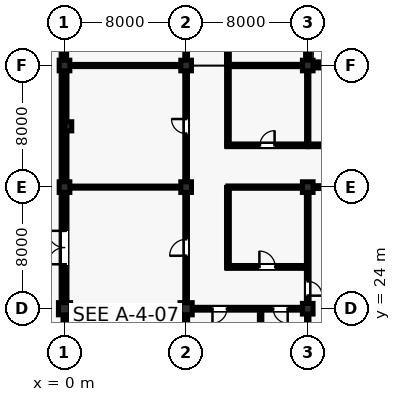
"""IFC4 building model, lengths in metres.
Left out: names, types, materials, properties, quantities, classifications, styles, units other than length and angle.
Written with IfcOpenShell. Run it as: python <this file> out.ifc"""

import sys

from ifc_helpers import new_model, si_unit, direction, frame, frame_2d, origin, origin_2d, place, context, subcontext, project, spatial, rectangle, extrude, element, fill, save


model = new_model("IFC4")
c1 = context("Model", 3, precision=1e-05, world=origin(), true_north=direction((0.0, 1.0)))
c2 = subcontext(c1, "Body", "Model", "MODEL_VIEW")
j1 = project(units=[si_unit("LENGTHUNIT", "METRE"), si_unit("PLANEANGLEUNIT", "RADIAN")], contexts=[c1])
p1 = place(None, origin())
s1 = spatial("IfcSite", under=j1, at=p1, CompositionType="ELEMENT")
p2 = place(p1, origin())
s2 = spatial("IfcBuilding", under=s1, at=p2, CompositionType="ELEMENT")
p3 = place(p2, origin())
s3 = spatial("IfcBuildingStorey", under=s2, at=p3, CompositionType="ELEMENT", Elevation=0.0)
p4 = place(p3, frame((0.0, 24.0, 0.0), z_axis=(0.0, 0.0, 1.0), x_axis=(1.0, 0.0, 0.0)))
e1 = element("IfcColumn", 1, at=p4, inside=s3, PredefinedType="COLUMN", context=c2, shape_type="SweptSolid", body=[
    extrude(rectangle(XDim=0.8, YDim=0.8, at=origin_2d()), origin(), (0.0, 0.0, 1.0), 5.28),
])
for number, where, z_axis, x_axis in (
    (2, (0.0, 32.0, 0.0), (0.0, 0.0, 1.0), (1.0, 0.0, 0.0)),
    (3, (0.0, 40.0, 0.0), (0.0, 0.0, 1.0), (1.0, 0.0, 0.0)),
):
    element("IfcColumn", number, at=place(p3, frame(where, z_axis=z_axis, x_axis=x_axis)), inside=s3, PredefinedType="COLUMN", context=c2, shape_type="SweptSolid", body=[
        extrude(rectangle(XDim=0.7, YDim=0.7, at=origin_2d()), origin(), (0.0, 0.0, 1.0), 5.28),
    ])
p5 = place(p3, frame((8.0, 24.0, 0.0), z_axis=(0.0, 0.0, 1.0), x_axis=(1.0, 0.0, 0.0)))
e4 = element("IfcColumn", 4, at=p5, inside=s3, PredefinedType="COLUMN", context=c2, shape_type="SweptSolid", body=[
    extrude(rectangle(XDim=0.8, YDim=0.8, at=origin_2d()), origin(), (0.0, 0.0, 1.0), 5.28),
])
for number, where, z_axis, x_axis in (
    (5, (8.0, 32.0, 0.0), (0.0, 0.0, 1.0), (1.0, 0.0, 0.0)),
    (6, (8.0, 40.0, 0.0), (0.0, 0.0, 1.0), (1.0, 0.0, 0.0)),
    (7, (16.0, 24.0, 0.0), (0.0, 0.0, 1.0), (1.0, 0.0, 0.0)),
    (8, (16.0, 32.0, 0.0), (0.0, 0.0, 1.0), (1.0, 0.0, 0.0)),
    (9, (16.0, 40.0, 0.0), (0.0, 0.0, 1.0), (1.0, 0.0, 0.0)),
):
    element("IfcColumn", number, at=place(p3, frame(where, z_axis=z_axis, x_axis=x_axis)), inside=s3, PredefinedType="COLUMN", context=c2, shape_type="SweptSolid", body=[
        extrude(rectangle(XDim=0.7, YDim=0.7, at=origin_2d()), origin(), (0.0, 0.0, 1.0), 5.28),
    ])
p6 = place(p3, frame((0.25, 36.0, 0.0), z_axis=(0.0, 0.0, 1.0), x_axis=(1.0, 0.0, 0.0)))
e10 = element("IfcColumn", 10, at=p6, inside=s3, PredefinedType="PILASTER", context=c2, shape_type="SweptSolid", body=[
    extrude(rectangle(XDim=0.45, YDim=0.6, at=origin_2d()), origin(), (0.0, 0.0, 1.0), 5.28),
])
p7 = place(p3, frame((0.0, 24.385, 0.0), z_axis=(0.0, 0.0, 1.0), x_axis=(0.0, 1.0, 0.0)))
e11 = element("IfcWall", 11, at=p7, inside=s3, PredefinedType="SOLIDWALL", context=c2, shape_type="SweptSolid", body=[
    extrude(rectangle(XDim=7.28, YDim=0.32, at=frame_2d((3.64, 0.0))), origin(), (0.0, 0.0, 1.0), 4.677),
])
p8 = place(p7, frame((2.54, 0.0, 0.0)))
e12 = element("IfcOpeningElement", 12, at=p8, cuts=e11, PredefinedType="OPENING", context=c2, shape_type="SweptSolid", body=[
    extrude(rectangle(XDim=2.2, YDim=2.5, at=frame_2d((1.1, 1.25))), frame((0.0, 0.17, 0.0), z_axis=(0.0, -1.0, 0.0), x_axis=(1.0, 0.0, 0.0)), (0.0, 0.0, 1.0), 0.34),
])
p9 = place(p3, frame((0.0, 32.335, 0.0), z_axis=(0.0, 0.0, 1.0), x_axis=(0.0, 1.0, 0.0)))
e13 = element("IfcWall", 13, at=p9, inside=s3, PredefinedType="SOLIDWALL", context=c2, shape_type="SweptSolid", body=[
    extrude(rectangle(XDim=7.33, YDim=0.32, at=frame_2d((3.665, 0.0))), origin(), (0.0, 0.0, 1.0), 4.61),
])
p10 = place(p9, frame((4.25, 0.0, 0.9)))
e14 = element("IfcOpeningElement", 14, at=p10, cuts=e13, PredefinedType="OPENING", context=c2, shape_type="SweptSolid", body=[
    extrude(rectangle(XDim=2.4, YDim=2.8, at=frame_2d((1.2, 1.4))), frame((0.0, 0.17, 0.0), z_axis=(0.0, -1.0, 0.0), x_axis=(1.0, 0.0, 0.0)), (0.0, 0.0, 1.0), 0.34),
])
p11 = place(p3, frame((0.0, 40.335, 0.0), z_axis=(0.0, 0.0, 1.0), x_axis=(0.0, 1.0, 0.0)))
e15 = element("IfcWall", 15, at=p11, inside=s3, PredefinedType="SOLIDWALL", context=c2, shape_type="SweptSolid", body=[
    extrude(rectangle(XDim=7.33, YDim=0.28, at=frame_2d((3.665, 0.0))), origin(), (0.0, 0.0, 1.0), 4.674),
])
p12 = place(p11, frame((3.09, 0.0, 0.0)))
e16 = element("IfcOpeningElement", 16, at=p12, cuts=e15, PredefinedType="OPENING", context=c2, shape_type="SweptSolid", body=[
    extrude(rectangle(XDim=1.15, YDim=2.2, at=frame_2d((0.575, 1.1))), frame((0.0, 0.15, 0.0), z_axis=(0.0, -1.0, 0.0), x_axis=(1.0, 0.0, 0.0)), (0.0, 0.0, 1.0), 0.3),
])
p13 = place(p3, frame((16.0, 40.335, 0.0), z_axis=(0.0, 0.0, 1.0), x_axis=(0.0, 1.0, 0.0)))
e17 = element("IfcWall", 17, at=p13, inside=s3, PredefinedType="SOLIDWALL", context=c2, shape_type="SweptSolid", body=[
    extrude(rectangle(XDim=7.33, YDim=0.28, at=frame_2d((3.665, 0.0))), origin(), (0.0, 0.0, 1.0), 4.677),
])
p14 = place(p13, frame((2.74, 0.0, 0.9)))
e18 = element("IfcOpeningElement", 18, at=p14, cuts=e17, PredefinedType="OPENING", context=c2, shape_type="SweptSolid", body=[
    extrude(rectangle(XDim=1.85, YDim=2.65, at=frame_2d((0.925, 1.325))), frame((0.0, 0.15, 0.0), z_axis=(0.0, -1.0, 0.0), x_axis=(1.0, 0.0, 0.0)), (0.0, 0.0, 1.0), 0.3),
])
p15 = place(p3, frame((16.335, 40.0, 0.0), z_axis=(0.0, 0.0, 1.0), x_axis=(1.0, 0.0, 0.0)))
e19 = element("IfcWall", 19, at=p15, inside=s3, PredefinedType="SOLIDWALL", context=c2, shape_type="SweptSolid", body=[
    extrude(rectangle(XDim=7.33, YDim=0.32, at=frame_2d((3.665, 0.0))), origin(), (0.0, 0.0, 1.0), 4.677),
])
p16 = place(p15, frame((2.74, 0.0, 0.9)))
e20 = element("IfcOpeningElement", 20, at=p16, cuts=e19, PredefinedType="OPENING", context=c2, shape_type="SweptSolid", body=[
    extrude(rectangle(XDim=1.85, YDim=2.65, at=frame_2d((0.925, 1.325))), frame((0.0, 0.17, 0.0), z_axis=(0.0, -1.0, 0.0), x_axis=(1.0, 0.0, 0.0)), (0.0, 0.0, 1.0), 0.34),
])
for number, where, z_axis, x_axis in (
    (21, (0.05, 16.29, 0.0), (0.0, 0.0, 1.0), (0.0, 1.0, 0.0)),
    (22, (0.29, 23.95, 0.0), (0.0, 0.0, 1.0), (1.0, 0.0, 0.0)),
    (23, (7.95, 16.29, 0.0), (0.0, 0.0, 1.0), (0.0, 1.0, 0.0)),
):
    element("IfcWall", number, at=place(p3, frame(where, z_axis=z_axis, x_axis=x_axis)), inside=s3, PredefinedType="SHEAR", context=c2, shape_type="SweptSolid", body=[
        extrude(rectangle(XDim=7.42, YDim=0.3, at=frame_2d((3.71, 0.0))), origin(), (0.0, 0.0, 1.0), 5.035),
    ])
p17 = place(p3, frame((4.0, 16.05, 0.0), z_axis=(0.0, 0.0, 1.0), x_axis=(0.0, 1.0, 0.0)))
e24 = element("IfcWall", 24, at=p17, inside=s3, PredefinedType="SHEAR", context=c2, shape_type="SweptSolid", body=[
    extrude(rectangle(XDim=7.9, YDim=0.3, at=frame_2d((3.95, 0.0))), origin(), (0.0, 0.0, 1.0), 5.035),
])
p18 = place(p17, frame((0.55, 0.0, 0.0)))
e25 = element("IfcOpeningElement", 25, at=p18, cuts=e24, PredefinedType="OPENING", context=c2, shape_type="SweptSolid", body=[
    extrude(rectangle(XDim=1.1, YDim=2.15, at=frame_2d((0.55, 1.075))), frame((0.0, 0.16, 0.0), z_axis=(0.0, -1.0, 0.0), x_axis=(1.0, 0.0, 0.0)), (0.0, 0.0, 1.0), 0.32),
])
p19 = place(p3, frame((10.7, 26.75, 0.0), z_axis=(0.0, 0.0, 1.0), x_axis=(1.0, 0.0, 0.0)))
e26 = element("IfcWall", 26, at=p19, inside=s3, PredefinedType="PARTITIONING", context=c2, shape_type="SweptSolid", body=[
    extrude(rectangle(XDim=5.28, YDim=0.185, at=frame_2d((2.64, 0.0))), origin(), (0.0, 0.0, 1.0), 4.667),
])
p20 = place(p19, frame((2.12, 0.0, 0.0)))
e27 = element("IfcOpeningElement", 27, at=p20, cuts=e26, PredefinedType="OPENING", context=c2, shape_type="SweptSolid", body=[
    extrude(rectangle(XDim=1.04, YDim=2.18, at=frame_2d((0.52, 1.09))), frame((0.0, 0.103, 0.0), z_axis=(0.0, -1.0, 0.0), x_axis=(1.0, 0.0, 0.0)), (0.0, 0.0, 1.0), 0.205),
])
p21 = place(p3, frame((10.75, 26.7, 0.0), z_axis=(0.0, 0.0, 1.0), x_axis=(0.0, 1.0, 0.0)))
e28 = element("IfcWall", 28, at=p21, inside=s3, PredefinedType="PARTITIONING", context=c2, shape_type="SweptSolid", body=[
    extrude(rectangle(XDim=5.28, YDim=0.185, at=frame_2d((2.64, 0.0))), origin(), (0.0, 0.0, 1.0), 4.403),
])
p22 = place(p3, frame((10.75, 32.0, 0.0), z_axis=(0.0, 0.0, 1.0), x_axis=(1.0, 0.0, 0.0)))
e29 = element("IfcWall", 29, at=p22, inside=s3, PredefinedType="PARTITIONING", context=c2, shape_type="SweptSolid", body=[
    extrude(rectangle(XDim=4.89, YDim=0.15, at=frame_2d((2.445, 0.0))), origin(), (0.0, 0.0, 1.0), 4.403),
])
p23 = place(p3, frame((10.7, 34.75, 0.0), z_axis=(0.0, 0.0, 1.0), x_axis=(1.0, 0.0, 0.0)))
e30 = element("IfcWall", 30, at=p23, inside=s3, PredefinedType="PARTITIONING", context=c2, shape_type="SweptSolid", body=[
    extrude(rectangle(XDim=5.28, YDim=0.175, at=frame_2d((2.64, 0.0))), origin(), (0.0, 0.0, 1.0), 4.404),
])
p24 = place(p23, frame((2.16, 0.0, 0.0)))
e31 = element("IfcOpeningElement", 31, at=p24, cuts=e30, PredefinedType="OPENING", context=c2, shape_type="SweptSolid", body=[
    extrude(rectangle(XDim=0.96, YDim=2.14, at=frame_2d((0.48, 1.07))), frame((0.0, 0.097, 0.0), z_axis=(0.0, -1.0, 0.0), x_axis=(1.0, 0.0, 0.0)), (0.0, 0.0, 1.0), 0.195),
])
p25 = place(p3, frame((10.75, 34.7, 0.0), z_axis=(0.0, 0.0, 1.0), x_axis=(0.0, 1.0, 0.0)))
e32 = element("IfcWall", 32, at=p25, inside=s3, PredefinedType="PARTITIONING", context=c2, shape_type="SweptSolid", body=[
    extrude(rectangle(XDim=5.28, YDim=0.175, at=frame_2d((2.64, 0.0))), origin(), (0.0, 0.0, 1.0), 4.336),
])
p26 = place(p3, frame((10.75, 40.0, 0.0), z_axis=(0.0, 0.0, 1.0), x_axis=(1.0, 0.0, 0.0)))
e33 = element("IfcWall", 33, at=p26, inside=s3, PredefinedType="PARTITIONING", context=c2, shape_type="SweptSolid", body=[
    extrude(rectangle(XDim=4.89, YDim=0.15, at=frame_2d((2.445, 0.0))), origin(), (0.0, 0.0, 1.0), 4.336),
])
p27 = place(p3, frame((16.0, 34.75, 0.0), z_axis=(0.0, 0.0, 1.0), x_axis=(0.0, 1.0, 0.0)))
e34 = element("IfcWall", 34, at=p27, inside=s3, PredefinedType="PARTITIONING", context=c2, shape_type="SweptSolid", body=[
    extrude(rectangle(XDim=4.89, YDim=0.15, at=frame_2d((2.445, 0.0))), origin(), (0.0, 0.0, 1.0), 4.404),
])
p28 = place(p3, frame((10.75, 40.02, 0.0), z_axis=(0.0, 0.0, 1.0), x_axis=(0.0, 1.0, 0.0)))
e35 = element("IfcWall", 35, at=p28, inside=s3, PredefinedType="PARTITIONING", context=c2, shape_type="SweptSolid", body=[
    extrude(rectangle(XDim=7.96, YDim=0.185, at=frame_2d((3.98, 0.0))), origin(), (0.0, 0.0, 1.0), 4.336),
])
p29 = place(p28, frame((3.42, 0.0, 0.0)))
e36 = element("IfcOpeningElement", 36, at=p29, cuts=e35, PredefinedType="OPENING", context=c2, shape_type="SweptSolid", body=[
    extrude(rectangle(XDim=1.12, YDim=2.22, at=frame_2d((0.56, 1.11))), frame((0.0, 0.103, 0.0), z_axis=(0.0, -1.0, 0.0), x_axis=(1.0, 0.0, 0.0)), (0.0, 0.0, 1.0), 0.205),
])
p30 = place(p3, frame((16.02, 34.75, 0.0), z_axis=(0.0, 0.0, 1.0), x_axis=(1.0, 0.0, 0.0)))
e37 = element("IfcWall", 37, at=p30, inside=s3, PredefinedType="PARTITIONING", context=c2, shape_type="SweptSolid", body=[
    extrude(rectangle(XDim=7.96, YDim=0.175, at=frame_2d((3.98, 0.0))), origin(), (0.0, 0.0, 1.0), 4.404),
])
p31 = place(p30, frame((3.49, 0.0, 0.0)))
e38 = element("IfcOpeningElement", 38, at=p31, cuts=e37, PredefinedType="OPENING", context=c2, shape_type="SweptSolid", body=[
    extrude(rectangle(XDim=0.98, YDim=2.15, at=frame_2d((0.49, 1.075))), frame((0.0, 0.097, 0.0), z_axis=(0.0, -1.0, 0.0), x_axis=(1.0, 0.0, 0.0)), (0.0, 0.0, 1.0), 0.195),
])
p32 = place(p3, frame((8.0, 24.39, 0.0), z_axis=(0.0, 0.0, 1.0), x_axis=(0.0, 1.0, 0.0)))
e39 = element("IfcWall", 39, at=p32, inside=s3, PredefinedType="PARTITIONING", context=c2, shape_type="SweptSolid", body=[
    extrude(rectangle(XDim=7.27, YDim=0.175, at=frame_2d((3.635, 0.0))), origin(), (0.0, 0.0, 1.0), 4.403),
])
p33 = place(p32, frame((3.095, 0.0, 0.0)))
e40 = element("IfcOpeningElement", 40, at=p33, cuts=e39, PredefinedType="OPENING", context=c2, shape_type="SweptSolid", body=[
    extrude(rectangle(XDim=1.08, YDim=2.2, at=frame_2d((0.54, 1.1))), frame((0.0, 0.097, 0.0), z_axis=(0.0, -1.0, 0.0), x_axis=(1.0, 0.0, 0.0)), (0.0, 0.0, 1.0), 0.195),
])
p34 = place(p3, frame((0.34, 32.0, 0.0), z_axis=(0.0, 0.0, 1.0), x_axis=(1.0, 0.0, 0.0)))
e41 = element("IfcWall", 41, at=p34, inside=s3, PredefinedType="PARTITIONING", context=c2, shape_type="SweptSolid", body=[
    extrude(rectangle(XDim=7.32, YDim=0.135, at=frame_2d((3.66, 0.0))), origin(), (0.0, 0.0, 1.0), 4.327),
])
p35 = place(p3, frame((8.0, 32.34, 0.0), z_axis=(0.0, 0.0, 1.0), x_axis=(0.0, 1.0, 0.0)))
e42 = element("IfcWall", 42, at=p35, inside=s3, PredefinedType="PARTITIONING", context=c2, shape_type="SweptSolid", body=[
    extrude(rectangle(XDim=7.32, YDim=0.175, at=frame_2d((3.66, 0.0))), origin(), (0.0, 0.0, 1.0), 4.412),
])
p36 = place(p35, frame((3.18, 0.0, 0.0)))
e43 = element("IfcOpeningElement", 43, at=p36, cuts=e42, PredefinedType="OPENING", context=c2, shape_type="SweptSolid", body=[
    extrude(rectangle(XDim=0.96, YDim=2.14, at=frame_2d((0.48, 1.07))), frame((0.0, 0.097, 0.0), z_axis=(0.0, -1.0, 0.0), x_axis=(1.0, 0.0, 0.0)), (0.0, 0.0, 1.0), 0.195),
])
p37 = place(p3, frame((0.34, 40.0, 0.0), z_axis=(0.0, 0.0, 1.0), x_axis=(1.0, 0.0, 0.0)))
e44 = element("IfcWall", 44, at=p37, inside=s3, PredefinedType="PARTITIONING", context=c2, shape_type="SweptSolid", body=[
    extrude(rectangle(XDim=7.32, YDim=0.142, at=frame_2d((3.66, 0.0))), origin(), (0.0, 0.0, 1.0), 4.403),
])
p38 = place(p3, frame((8.0, 40.34, 0.0), z_axis=(0.0, 0.0, 1.0), x_axis=(0.0, 1.0, 0.0)))
e45 = element("IfcWall", 45, at=p38, inside=s3, PredefinedType="PARTITIONING", context=c2, shape_type="SweptSolid", body=[
    extrude(rectangle(XDim=7.32, YDim=0.175, at=frame_2d((3.66, 0.0))), origin(), (0.0, 0.0, 1.0), 4.404),
])
p39 = place(p38, frame((3.06, 0.0, 0.0)))
e46 = element("IfcOpeningElement", 46, at=p39, cuts=e45, PredefinedType="OPENING", context=c2, shape_type="SweptSolid", body=[
    extrude(rectangle(XDim=1.2, YDim=2.15, at=frame_2d((0.6, 1.075))), frame((0.0, 0.097, 0.0), z_axis=(0.0, -1.0, 0.0), x_axis=(1.0, 0.0, 0.0)), (0.0, 0.0, 1.0), 0.195),
])
p40 = place(p3, frame((16.0, 16.34, 0.0), z_axis=(0.0, 0.0, 1.0), x_axis=(0.0, 1.0, 0.0)))
e47 = element("IfcWall", 47, at=p40, inside=s3, PredefinedType="PARTITIONING", context=c2, shape_type="SweptSolid", body=[
    extrude(rectangle(XDim=7.32, YDim=0.16, at=frame_2d((3.66, 0.0))), origin(), (0.0, 0.0, 1.0), 4.603),
])
p41 = place(p3, frame((8.39, 24.0, 0.0), z_axis=(0.0, 0.0, 1.0), x_axis=(1.0, 0.0, 0.0)))
e48 = element("IfcWall", 48, at=p41, inside=s3, PredefinedType="PARTITIONING", context=c2, shape_type="SweptSolid", body=[
    extrude(rectangle(XDim=7.27, YDim=0.185, at=frame_2d((3.635, 0.0))), origin(), (0.0, 0.0, 1.0), 4.327),
])
p42 = place(p41, frame((1.343, 0.0, 0.0)))
e49 = element("IfcOpeningElement", 49, at=p42, cuts=e48, PredefinedType="OPENING", context=c2, shape_type="SweptSolid", body=[
    extrude(rectangle(XDim=0.95, YDim=2.1, at=frame_2d((0.475, 1.05))), frame((0.0, 0.103, 0.0), z_axis=(0.0, -1.0, 0.0), x_axis=(1.0, 0.0, 0.0)), (0.0, 0.0, 1.0), 0.205),
])
p43 = place(p41, frame((5.341, 0.0, 0.0)))
e50 = element("IfcOpeningElement", 50, at=p43, cuts=e48, PredefinedType="OPENING", context=c2, shape_type="SweptSolid", body=[
    extrude(rectangle(XDim=0.95, YDim=2.1, at=frame_2d((0.475, 1.05))), frame((0.0, 0.103, 0.0), z_axis=(0.0, -1.0, 0.0), x_axis=(1.0, 0.0, 0.0)), (0.0, 0.0, 1.0), 0.205),
])
p44 = place(p3, frame((16.0, 24.34, 0.0), z_axis=(0.0, 0.0, 1.0), x_axis=(0.0, 1.0, 0.0)))
e51 = element("IfcWall", 51, at=p44, inside=s3, PredefinedType="PARTITIONING", context=c2, shape_type="SweptSolid", body=[
    extrude(rectangle(XDim=7.32, YDim=0.175, at=frame_2d((3.66, 0.0))), origin(), (0.0, 0.0, 1.0), 4.667),
])
p45 = place(p44, frame((0.52, 0.0, 0.0)))
e52 = element("IfcOpeningElement", 52, at=p45, cuts=e51, PredefinedType="OPENING", context=c2, shape_type="SweptSolid", body=[
    extrude(rectangle(XDim=0.94, YDim=2.12, at=frame_2d((0.47, 1.06))), frame((0.0, 0.097, 0.0), z_axis=(0.0, -1.0, 0.0), x_axis=(1.0, 0.0, 0.0)), (0.0, 0.0, 1.0), 0.195),
])
p46 = place(p3, frame((16.34, 32.0, 0.0), z_axis=(0.0, 0.0, 1.0), x_axis=(1.0, 0.0, 0.0)))
e53 = element("IfcWall", 53, at=p46, inside=s3, PredefinedType="PARTITIONING", context=c2, shape_type="SweptSolid", body=[
    extrude(rectangle(XDim=7.32, YDim=0.185, at=frame_2d((3.66, 0.0))), origin(), (0.0, 0.0, 1.0), 4.607),
])
p47 = place(p46, frame((2.76, 0.0, 0.0)))
e54 = element("IfcOpeningElement", 54, at=p47, cuts=e53, PredefinedType="OPENING", context=c2, shape_type="SweptSolid", body=[
    extrude(rectangle(XDim=1.8, YDim=2.35, at=frame_2d((0.9, 1.175))), frame((0.0, 0.103, 0.0), z_axis=(0.0, -1.0, 0.0), x_axis=(1.0, 0.0, 0.0)), (0.0, 0.0, 1.0), 0.205),
])
p48 = place(p3, frame((12.9, 16.02, 0.0), z_axis=(0.0, 0.0, 1.0), x_axis=(0.0, 1.0, 0.0)))
e55 = element("IfcWall", 55, at=p48, inside=s3, PredefinedType="PARTITIONING", context=c2, shape_type="SweptSolid", body=[
    extrude(rectangle(XDim=7.96, YDim=0.16, at=frame_2d((3.98, 0.0))), origin(), (0.0, 0.0, 1.0), 4.327),
])
p49 = place(p8, origin())
e56 = element("IfcDoor", 56, at=p49, inside=s3, OperationType="DOUBLE_DOOR_SINGLE_SWING", PredefinedType="DOOR", context=c2, shape_type="SweptSolid", body=[
    extrude(rectangle(XDim=2.2, YDim=2.5, at=frame_2d((1.1, 1.25))), frame((0.0, 0.025, 0.0), z_axis=(0.0, -1.0, 0.0), x_axis=(1.0, 0.0, 0.0)), (0.0, 0.0, 1.0), 0.05),
])
fill(e12, e56)
p50 = place(p10, origin())
e57 = element("IfcWindow", 57, at=p50, inside=s3, PartitioningType="SINGLE_PANEL", PredefinedType="WINDOW", context=c2, shape_type="SweptSolid", body=[
    extrude(rectangle(XDim=2.4, YDim=2.8, at=frame_2d((1.2, 1.4))), frame((0.0, 0.03, 0.0), z_axis=(0.0, -1.0, 0.0), x_axis=(1.0, 0.0, 0.0)), (0.0, 0.0, 1.0), 0.06),
])
fill(e14, e57)
p51 = place(p20, origin())
e58 = element("IfcDoor", 58, at=p51, inside=s3, OperationType="SINGLE_SWING_LEFT", PredefinedType="DOOR", context=c2, shape_type="SweptSolid", body=[
    extrude(rectangle(XDim=1.04, YDim=2.18, at=frame_2d((0.52, 1.09))), frame((0.0, 0.025, 0.0), z_axis=(0.0, -1.0, 0.0), x_axis=(1.0, 0.0, 0.0)), (0.0, 0.0, 1.0), 0.05),
])
fill(e27, e58)
p52 = place(p24, origin())
e59 = element("IfcDoor", 59, at=p52, inside=s3, OperationType="SINGLE_SWING_RIGHT", PredefinedType="DOOR", context=c2, shape_type="SweptSolid", body=[
    extrude(rectangle(XDim=0.96, YDim=2.14, at=frame_2d((0.48, 1.07))), frame((0.0, 0.025, 0.0), z_axis=(0.0, -1.0, 0.0), x_axis=(1.0, 0.0, 0.0)), (0.0, 0.0, 1.0), 0.05),
])
fill(e31, e59)
p53 = place(p33, origin())
e60 = element("IfcDoor", 60, at=p53, inside=s3, OperationType="SINGLE_SWING_LEFT", PredefinedType="DOOR", context=c2, shape_type="SweptSolid", body=[
    extrude(rectangle(XDim=1.08, YDim=2.2, at=frame_2d((0.54, 1.1))), frame((0.0, 0.025, 0.0), z_axis=(0.0, -1.0, 0.0), x_axis=(1.0, 0.0, 0.0)), (0.0, 0.0, 1.0), 0.05),
])
fill(e40, e60)
p54 = place(p36, origin())
e61 = element("IfcDoor", 61, at=p54, inside=s3, OperationType="SINGLE_SWING_RIGHT", PredefinedType="DOOR", context=c2, shape_type="SweptSolid", body=[
    extrude(rectangle(XDim=0.96, YDim=2.14, at=frame_2d((0.48, 1.07))), frame((0.0, 0.025, 0.0), z_axis=(0.0, -1.0, 0.0), x_axis=(1.0, 0.0, 0.0)), (0.0, 0.0, 1.0), 0.05),
])
fill(e43, e61)
p55 = place(p42, frame((0.95, 0.0, 0.0), z_axis=(0.0, 0.0, 1.0), x_axis=(-1.0, 0.0, 0.0)))
e62 = element("IfcDoor", 62, at=p55, inside=s3, OperationType="SINGLE_SWING_LEFT", PredefinedType="DOOR", context=c2, shape_type="SweptSolid", body=[
    extrude(rectangle(XDim=0.95, YDim=2.1, at=frame_2d((0.475, 1.05))), frame((0.0, 0.025, 0.0), z_axis=(0.0, -1.0, 0.0), x_axis=(1.0, 0.0, 0.0)), (0.0, 0.0, 1.0), 0.05),
])
fill(e49, e62)
p56 = place(p43, frame((0.95, 0.0, 0.0), z_axis=(0.0, 0.0, 1.0), x_axis=(-1.0, 0.0, 0.0)))
e63 = element("IfcDoor", 63, at=p56, inside=s3, OperationType="SINGLE_SWING_RIGHT", PredefinedType="DOOR", context=c2, shape_type="SweptSolid", body=[
    extrude(rectangle(XDim=0.95, YDim=2.1, at=frame_2d((0.475, 1.05))), frame((0.0, 0.025, 0.0), z_axis=(0.0, -1.0, 0.0), x_axis=(1.0, 0.0, 0.0)), (0.0, 0.0, 1.0), 0.05),
])
fill(e50, e63)
p57 = place(p45, frame((0.94, 0.0, 0.0), z_axis=(0.0, 0.0, 1.0), x_axis=(-1.0, 0.0, 0.0)))
e64 = element("IfcDoor", 64, at=p57, inside=s3, OperationType="SINGLE_SWING_LEFT", PredefinedType="DOOR", context=c2, shape_type="SweptSolid", body=[
    extrude(rectangle(XDim=0.94, YDim=2.12, at=frame_2d((0.47, 1.06))), frame((0.0, 0.025, 0.0), z_axis=(0.0, -1.0, 0.0), x_axis=(1.0, 0.0, 0.0)), (0.0, 0.0, 1.0), 0.05),
])
fill(e52, e64)
save(model, sys.argv[1])
